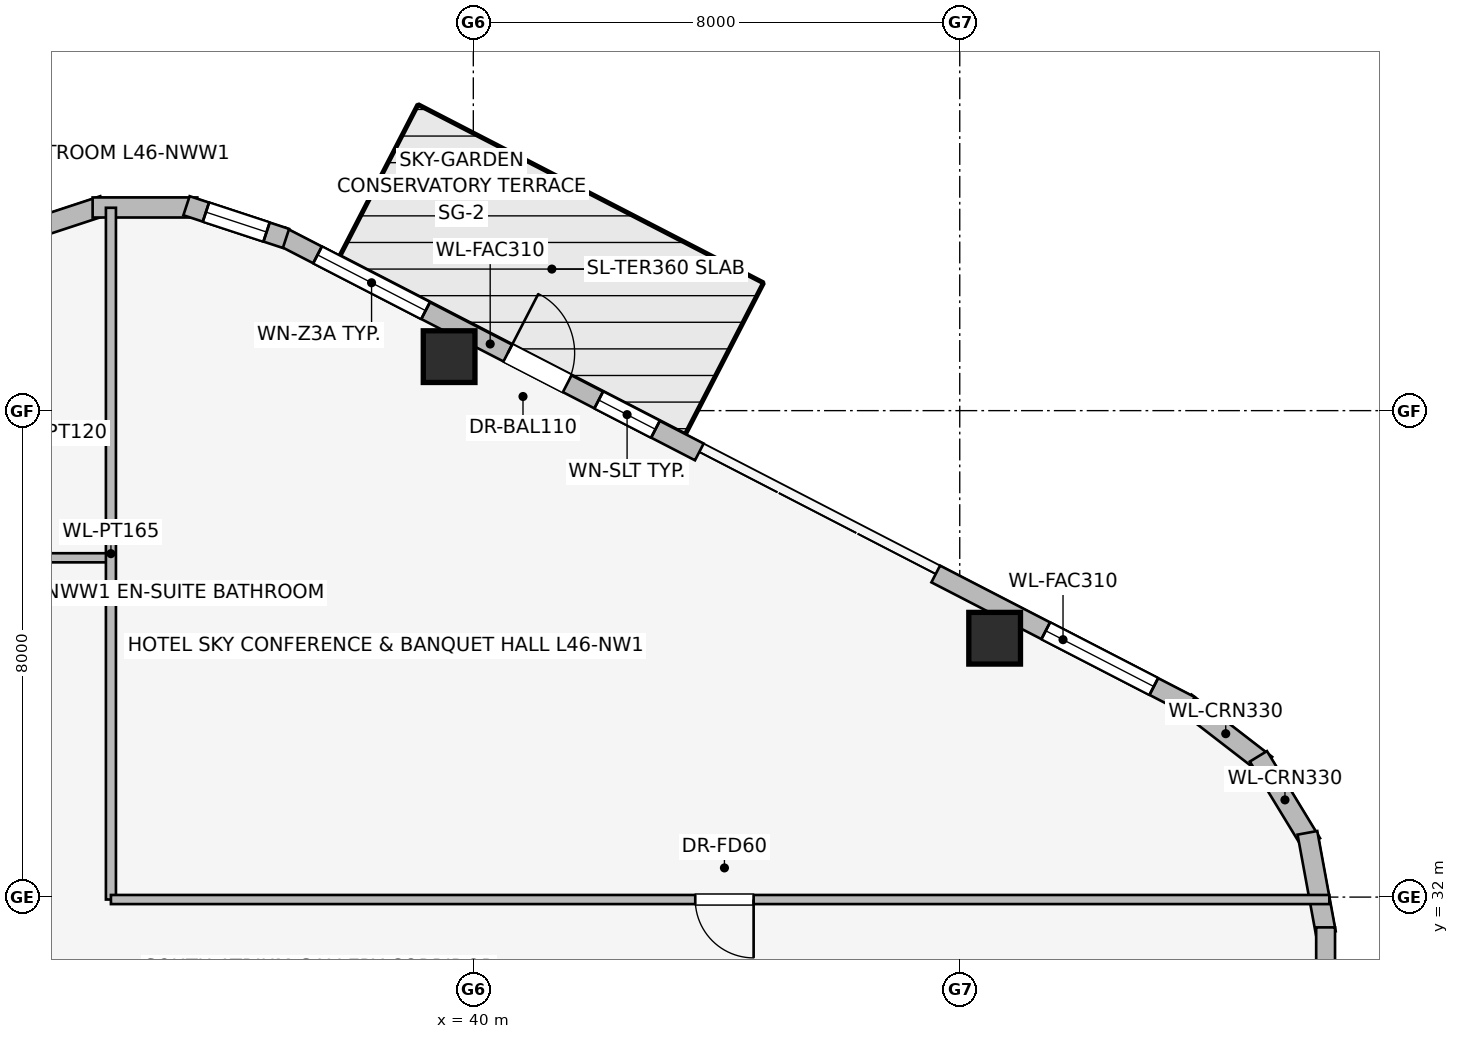
"""IFC4 building model, lengths in metres.
Left out: names, types, materials, properties, quantities, classifications, styles, units other than length and angle.
Written with IfcOpenShell. Run it as: python <this file> out.ifc"""

import sys

from ifc_helpers import new_model, si_unit, direction, frame, frame_2d, origin, origin_2d, place, context, subcontext, project, spatial, rectangle, extrude, element, fill, save


model = new_model("IFC4")
c1 = context("Model", 3, precision=1e-05, world=origin(), true_north=direction((0.0, 1.0)))
c2 = subcontext(c1, "Body", "Model", "MODEL_VIEW")
j1 = project(units=[si_unit("LENGTHUNIT", "METRE"), si_unit("PLANEANGLEUNIT", "RADIAN")], contexts=[c1])
p1 = place(None, origin())
s1 = spatial("IfcSite", under=j1, at=p1, CompositionType="ELEMENT")
p2 = place(p1, origin())
s2 = spatial("IfcBuilding", under=s1, at=p2, CompositionType="ELEMENT")
p3 = place(p2, frame((0.0, 0.0, 170.55)))
s3 = spatial("IfcBuildingStorey", under=s2, at=p3, CompositionType="ELEMENT", Elevation=170.55)
for number, where, z_axis, x_axis in (
    (1, (48.574, 36.257, 0.0), (0.0, 0.0, 1.0), (1.0, 0.0, 0.0)),
    (2, (39.602, 40.888, 0.0), (0.0, 0.0, 1.0), (1.0, 0.0, 0.0)),
):
    element("IfcColumn", number, at=place(p3, frame(where, z_axis=z_axis, x_axis=x_axis)), inside=s3, PredefinedType="COLUMN", context=c2, shape_type="SweptSolid", body=[
        extrude(rectangle(XDim=0.85, YDim=0.85, at=origin_2d()), origin(), (0.0, 0.0, 1.0), 3.45),
    ])
p4 = place(p3, frame((51.711, 35.2, 0.0), z_axis=(0.0, 0.0, 1.0), x_axis=(0.791464279355, -0.611215423976, 0.0)))
e3 = element("IfcWall", 3, at=p4, inside=s3, PredefinedType="STANDARD", context=c2, shape_type="SweptSolid", body=[
    extrude(rectangle(XDim=1.677, YDim=0.33, at=frame_2d((0.838, 0.0))), origin(), (0.0, 0.0, 1.0), 3.16),
])
p5 = place(p3, frame((52.912, 34.315, 0.0), z_axis=(0.0, 0.0, 1.0), x_axis=(0.520219286058, -0.85403272444, 0.0)))
e4 = element("IfcWall", 4, at=p5, inside=s3, PredefinedType="STANDARD", context=c2, shape_type="SweptSolid", body=[
    extrude(rectangle(XDim=1.678, YDim=0.33, at=frame_2d((0.839, 0.0))), origin(), (0.0, 0.0, 1.0), 3.16),
])
p6 = place(p3, frame((53.718, 33.057, 0.0), z_axis=(0.0, 0.0, 1.0), x_axis=(0.180717642671, -0.983535019014, 0.0)))
e5 = element("IfcWall", 5, at=p6, inside=s3, PredefinedType="STANDARD", context=c2, shape_type="SweptSolid", body=[
    extrude(rectangle(XDim=1.677, YDim=0.33, at=frame_2d((0.838, 0.0))), origin(), (0.0, 0.0, 1.0), 3.16),
])
p7 = place(p3, frame((36.838, 42.871, 0.0), z_axis=(0.0, 0.0, 1.0), x_axis=(0.888645948291, -0.458593914686, 0.0)))
e6 = element("IfcWall", 6, at=p7, inside=s3, PredefinedType="STANDARD", context=c2, shape_type="SweptSolid", body=[
    extrude(rectangle(XDim=7.741, YDim=0.31, at=frame_2d((3.871, 0.0))), origin(), (0.0, 0.0, 1.0), 3.16),
])
p8 = place(p7, frame((4.196, 0.0, 0.0)))
e7 = element("IfcOpeningElement", 7, at=p8, cuts=e6, PredefinedType="OPENING", context=c2, shape_type="SweptSolid", body=[
    extrude(rectangle(XDim=1.1, YDim=2.04, at=frame_2d((0.55, 1.02))), frame((0.0, 0.165, 0.0), z_axis=(0.0, -1.0, 0.0), x_axis=(1.0, 0.0, 0.0)), (0.0, 0.0, 1.0), 0.33),
])
p9 = place(p7, frame((0.675, 0.0, 0.75)))
e8 = element("IfcOpeningElement", 8, at=p9, cuts=e6, PredefinedType="OPENING", context=c2, shape_type="SweptSolid", body=[
    extrude(rectangle(XDim=2.0, YDim=1.5, at=frame_2d((1.0, 0.75))), frame((0.0, 0.165, 0.0), z_axis=(0.0, -1.0, 0.0), x_axis=(1.0, 0.0, 0.0)), (0.0, 0.0, 1.0), 0.33),
])
p10 = place(p7, frame((5.879, 0.0, 0.75)))
e9 = element("IfcOpeningElement", 9, at=p10, cuts=e6, PredefinedType="OPENING", context=c2, shape_type="SweptSolid", body=[
    extrude(rectangle(XDim=1.05, YDim=1.4, at=frame_2d((0.525, 0.7))), frame((0.0, 0.165, 0.0), z_axis=(0.0, -1.0, 0.0), x_axis=(1.0, 0.0, 0.0)), (0.0, 0.0, 1.0), 0.33),
])
p11 = place(p3, frame((47.605, 37.314, 0.0), z_axis=(0.0, 0.0, 1.0), x_axis=(0.888633599899, -0.458617842141, 0.0)))
e10 = element("IfcWall", 10, at=p11, inside=s3, PredefinedType="STANDARD", context=c2, shape_type="SweptSolid", body=[
    extrude(rectangle(XDim=4.712, YDim=0.31, at=frame_2d((2.356, 0.0))), origin(), (0.0, 0.0, 1.0), 3.16),
])
p12 = place(p11, frame((2.036, 0.0, 0.75)))
e11 = element("IfcOpeningElement", 11, at=p12, cuts=e10, PredefinedType="OPENING", context=c2, shape_type="SweptSolid", body=[
    extrude(rectangle(XDim=2.0, YDim=1.5, at=frame_2d((1.0, 0.75))), frame((0.0, 0.165, 0.0), z_axis=(0.0, -1.0, 0.0), x_axis=(1.0, 0.0, 0.0)), (0.0, 0.0, 1.0), 0.33),
])
p13 = place(p3, frame((32.281, 42.832, 0.0), z_axis=(0.0, 0.0, 1.0), x_axis=(0.949937416267, 0.312440242569, 0.0)))
e12 = element("IfcWall", 12, at=p13, inside=s3, PredefinedType="STANDARD", context=c2, shape_type="SweptSolid", body=[
    extrude(rectangle(XDim=1.722, YDim=0.33, at=frame_2d((0.861, 0.0))), origin(), (0.0, 0.0, 1.0), 3.16),
])
p14 = place(p3, frame((33.739, 43.341, 0.0), z_axis=(0.0, 0.0, 1.0), x_axis=(1.0, 0.0, 0.0)))
e13 = element("IfcWall", 13, at=p14, inside=s3, PredefinedType="STANDARD", context=c2, shape_type="SweptSolid", body=[
    extrude(rectangle(XDim=1.722, YDim=0.33, at=frame_2d((0.861, 0.0))), origin(), (0.0, 0.0, 1.0), 3.16),
])
p15 = place(p3, frame((35.283, 43.37, 0.0), z_axis=(0.0, 0.0, 1.0), x_axis=(0.949937416267, -0.312440242569, 0.0)))
e14 = element("IfcWall", 14, at=p15, inside=s3, PredefinedType="STANDARD", context=c2, shape_type="SweptSolid", body=[
    extrude(rectangle(XDim=1.722, YDim=0.33, at=frame_2d((0.861, 0.0))), origin(), (0.0, 0.0, 1.0), 3.16),
])
p16 = place(p15, frame((0.336, 0.0, 0.75)))
e15 = element("IfcOpeningElement", 15, at=p16, cuts=e14, PredefinedType="OPENING", context=c2, shape_type="SweptSolid", body=[
    extrude(rectangle(XDim=1.05, YDim=1.4, at=frame_2d((0.525, 0.7))), frame((0.0, 0.175, 0.0), z_axis=(0.0, -1.0, 0.0), x_axis=(1.0, 0.0, 0.0)), (0.0, 0.0, 1.0), 0.35),
])
p17 = place(p3, frame((54.017, 31.502, 0.0), z_axis=(0.0, 0.0, 1.0), x_axis=(0.0, -1.0, 0.0)))
e16 = element("IfcWall", 16, at=p17, inside=s3, PredefinedType="STANDARD", context=c2, shape_type="SweptSolid", body=[
    extrude(rectangle(XDim=15.004, YDim=0.31, at=frame_2d((7.502, 0.0))), origin(), (0.0, 0.0, 1.0), 3.16),
])
p18 = place(p17, frame((4.353, 0.0, 0.75)))
e17 = element("IfcOpeningElement", 17, at=p18, cuts=e16, PredefinedType="OPENING", context=c2, shape_type="SweptSolid", body=[
    extrude(rectangle(XDim=2.0, YDim=1.5, at=frame_2d((1.0, 0.75))), frame((0.0, 0.165, 0.0), z_axis=(0.0, -1.0, 0.0), x_axis=(1.0, 0.0, 0.0)), (0.0, 0.0, 1.0), 0.33),
])
p19 = place(p17, frame((8.083, 0.0, 0.75)))
e18 = element("IfcOpeningElement", 18, at=p19, cuts=e16, PredefinedType="OPENING", context=c2, shape_type="SweptSolid", body=[
    extrude(rectangle(XDim=1.35, YDim=1.45, at=frame_2d((0.675, 0.725))), frame((0.0, 0.165, 0.0), z_axis=(0.0, -1.0, 0.0), x_axis=(1.0, 0.0, 0.0)), (0.0, 0.0, 1.0), 0.33),
])
p20 = place(p17, frame((9.87, 0.0, 0.75)))
e19 = element("IfcOpeningElement", 19, at=p20, cuts=e16, PredefinedType="OPENING", context=c2, shape_type="SweptSolid", body=[
    extrude(rectangle(XDim=1.35, YDim=1.45, at=frame_2d((0.675, 0.725))), frame((0.0, 0.165, 0.0), z_axis=(0.0, -1.0, 0.0), x_axis=(1.0, 0.0, 0.0)), (0.0, 0.0, 1.0), 0.33),
])
p21 = place(p3, frame((34.0, 39.64, 0.0), z_axis=(0.0, 0.0, 1.0), x_axis=(-1.0, 0.0, 0.0)))
e20 = element("IfcWall", 20, at=p21, inside=s3, PredefinedType="PARTITIONING", context=c2, shape_type="SweptSolid", body=[
    extrude(rectangle(XDim=2.34, YDim=0.12, at=frame_2d((1.17, 0.0))), origin(), (0.0, 0.0, 1.0), 3.16),
])
p22 = place(p3, frame((34.0, 37.58, 0.0), z_axis=(0.0, 0.0, 1.0), x_axis=(-1.0, 0.0, 0.0)))
e21 = element("IfcWall", 21, at=p22, inside=s3, PredefinedType="PARTITIONING", context=c2, shape_type="SweptSolid", body=[
    extrude(rectangle(XDim=12.075, YDim=0.15, at=frame_2d((6.038, 0.0))), origin(), (0.0, 0.0, 1.0), 2.552),
])
p23 = place(p22, frame((4.96, 0.0, 0.0)))
e22 = element("IfcOpeningElement", 22, at=p23, cuts=e21, PredefinedType="OPENING", context=c2, shape_type="SweptSolid", body=[
    extrude(rectangle(XDim=0.96, YDim=2.0, at=frame_2d((0.48, 1.0))), frame((0.0, 0.085, 0.0), z_axis=(0.0, -1.0, 0.0), x_axis=(1.0, 0.0, 0.0)), (0.0, 0.0, 1.0), 0.17),
])
p24 = place(p3, frame((34.04, 31.96, 0.0), z_axis=(0.0, 0.0, 1.0), x_axis=(0.0, 1.0, 0.0)))
e23 = element("IfcWall", 23, at=p24, inside=s3, PredefinedType="PARTITIONING", context=c2, shape_type="SweptSolid", body=[
    extrude(rectangle(XDim=11.376, YDim=0.165, at=frame_2d((5.688, 0.0))), origin(), (0.0, 0.0, 1.0), 3.16),
])
p25 = place(p3, frame((54.078, 31.96, 0.0), z_axis=(0.0, 0.0, 1.0), x_axis=(-1.0, 0.0, 0.0)))
e24 = element("IfcWall", 24, at=p25, inside=s3, PredefinedType="PARTITIONING", context=c2, shape_type="SweptSolid", body=[
    extrude(rectangle(XDim=20.038, YDim=0.15, at=frame_2d((10.019, 0.0))), origin(), (0.0, 0.0, 1.0), 3.16),
])
p26 = place(p25, frame((9.468, 0.0, 0.0)))
e25 = element("IfcOpeningElement", 25, at=p26, cuts=e24, PredefinedType="OPENING", context=c2, shape_type="SweptSolid", body=[
    extrude(rectangle(XDim=0.96, YDim=2.0, at=frame_2d((0.48, 1.0))), frame((0.0, 0.085, 0.0), z_axis=(0.0, -1.0, 0.0), x_axis=(1.0, 0.0, 0.0)), (0.0, 0.0, 1.0), 0.17),
])
p27 = place(p8, origin())
e26 = element("IfcDoor", 26, at=p27, inside=s3, OperationType="SINGLE_SWING_LEFT", PredefinedType="DOOR", context=c2, shape_type="SweptSolid", body=[
    extrude(rectangle(XDim=1.1, YDim=2.04, at=frame_2d((0.55, 1.02))), frame((0.0, 0.025, 0.0), z_axis=(0.0, -1.0, 0.0), x_axis=(1.0, 0.0, 0.0)), (0.0, 0.0, 1.0), 0.05),
])
fill(e7, e26)
p28 = place(p9, origin())
e27 = element("IfcWindow", 27, at=p28, inside=s3, PartitioningType="SINGLE_PANEL", PredefinedType="WINDOW", context=c2, shape_type="SweptSolid", body=[
    extrude(rectangle(XDim=2.0, YDim=1.5, at=frame_2d((1.0, 0.75))), frame((0.0, 0.03, 0.0), z_axis=(0.0, -1.0, 0.0), x_axis=(1.0, 0.0, 0.0)), (0.0, 0.0, 1.0), 0.06),
])
fill(e8, e27)
p29 = place(p10, origin())
e28 = element("IfcWindow", 28, at=p29, inside=s3, PartitioningType="SINGLE_PANEL", PredefinedType="WINDOW", context=c2, shape_type="SweptSolid", body=[
    extrude(rectangle(XDim=1.05, YDim=1.4, at=frame_2d((0.525, 0.7))), frame((0.0, 0.03, 0.0), z_axis=(0.0, -1.0, 0.0), x_axis=(1.0, 0.0, 0.0)), (0.0, 0.0, 1.0), 0.06),
])
fill(e9, e28)
p30 = place(p12, origin())
e29 = element("IfcWindow", 29, at=p30, inside=s3, PartitioningType="SINGLE_PANEL", PredefinedType="WINDOW", context=c2, shape_type="SweptSolid", body=[
    extrude(rectangle(XDim=2.0, YDim=1.5, at=frame_2d((1.0, 0.75))), frame((0.0, 0.03, 0.0), z_axis=(0.0, -1.0, 0.0), x_axis=(1.0, 0.0, 0.0)), (0.0, 0.0, 1.0), 0.06),
])
fill(e11, e29)
p31 = place(p16, origin())
e30 = element("IfcWindow", 30, at=p31, inside=s3, PartitioningType="SINGLE_PANEL", PredefinedType="WINDOW", context=c2, shape_type="SweptSolid", body=[
    extrude(rectangle(XDim=1.05, YDim=1.4, at=frame_2d((0.525, 0.7))), frame((0.0, 0.03, 0.0), z_axis=(0.0, -1.0, 0.0), x_axis=(1.0, 0.0, 0.0)), (0.0, 0.0, 1.0), 0.06),
])
fill(e15, e30)
p32 = place(p26, origin())
e31 = element("IfcDoor", 31, at=p32, inside=s3, OperationType="SINGLE_SWING_LEFT", PredefinedType="DOOR", context=c2, shape_type="SweptSolid", body=[
    extrude(rectangle(XDim=0.96, YDim=2.0, at=frame_2d((0.48, 1.0))), frame((0.0, 0.025, 0.0), z_axis=(0.0, -1.0, 0.0), x_axis=(1.0, 0.0, 0.0)), (0.0, 0.0, 1.0), 0.05),
])
fill(e25, e31)
save(model, sys.argv[1])
